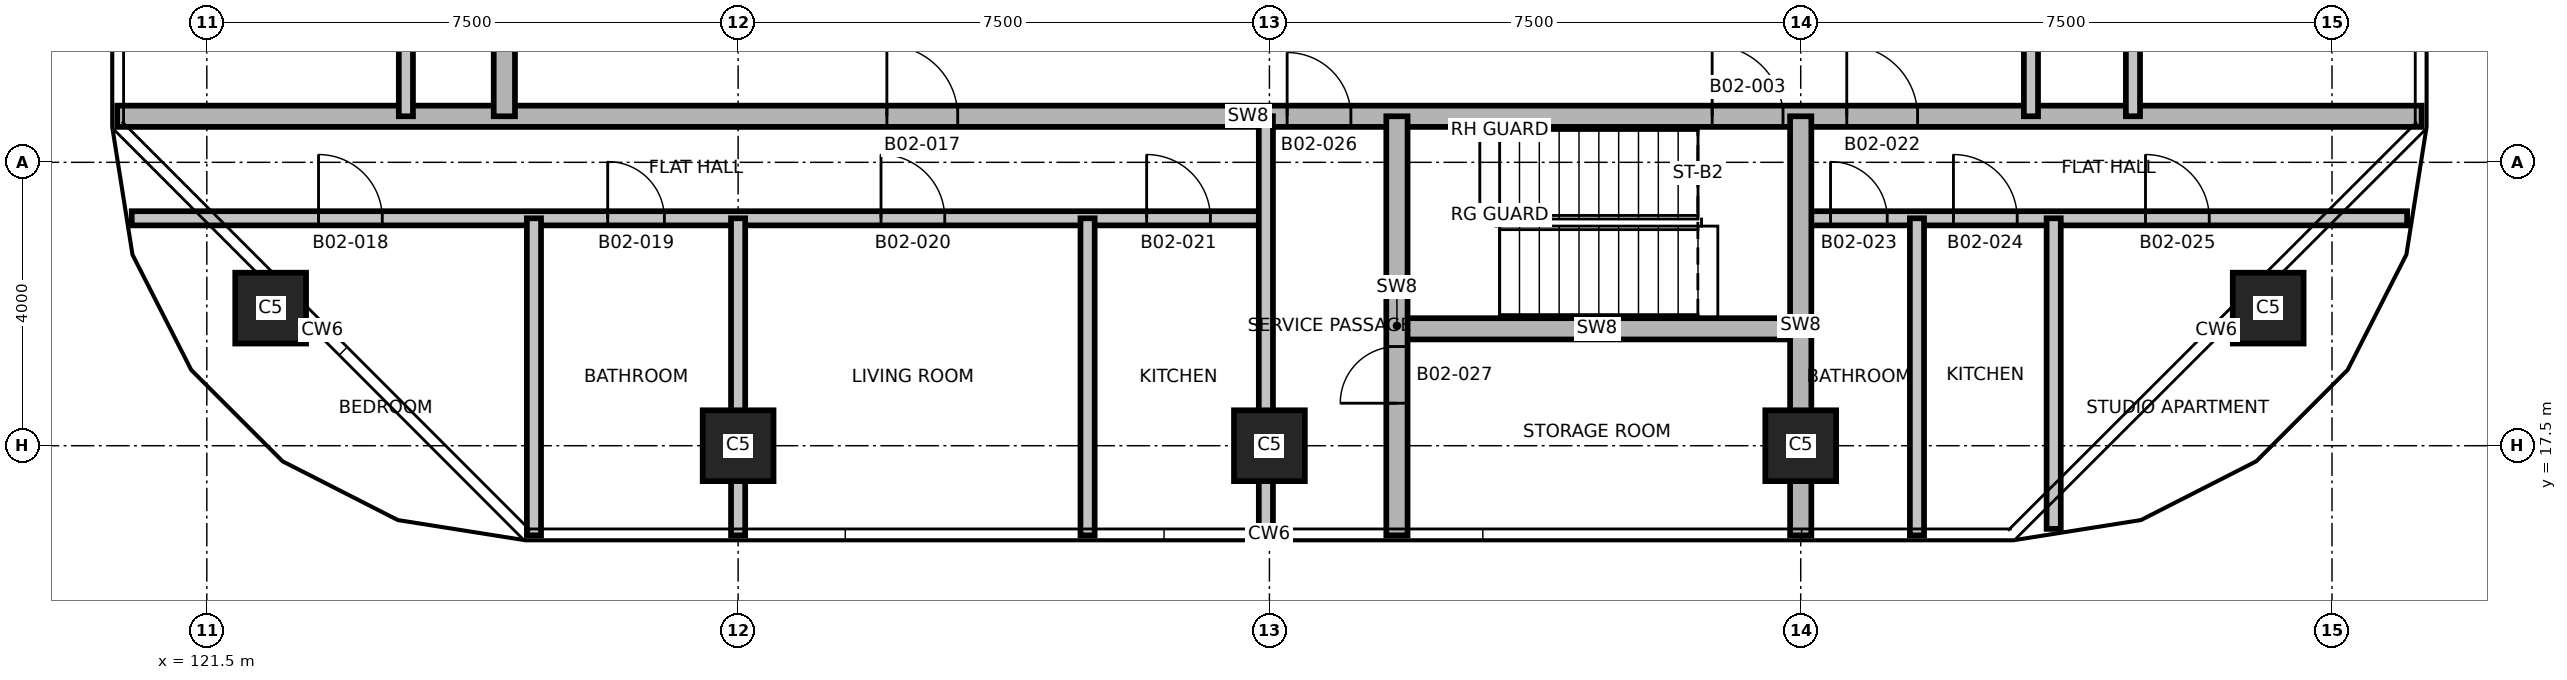
"""IFC4 building model, lengths in metres.
Left out: names, types, materials, properties, quantities, classifications, styles, units other than length and angle.
Written with IfcOpenShell. Run it as: python <this file> out.ifc"""

import sys

from ifc_helpers import new_model, si_unit, direction, frame, frame_2d, origin, origin_2d, place, context, subcontext, project, spatial, rectangle, extrude, element, fill, save


model = new_model("IFC4")
c1 = context("Model", 3, precision=1e-05, world=origin(), true_north=direction((0.0, 1.0)))
c2 = subcontext(c1, "Body", "Model", "MODEL_VIEW")
j1 = project(units=[si_unit("LENGTHUNIT", "METRE"), si_unit("PLANEANGLEUNIT", "RADIAN")], contexts=[c1])
p1 = place(None, origin())
s1 = spatial("IfcSite", under=j1, at=p1, CompositionType="ELEMENT")
p2 = place(p1, origin())
s2 = spatial("IfcBuilding", under=s1, at=p2, CompositionType="ELEMENT")
p3 = place(p2, frame((0.0, 0.0, 44.6)))
s3 = spatial("IfcBuildingStorey", under=s2, at=p3, CompositionType="ELEMENT", Elevation=44.6)
for number, where, z_axis, x_axis in (
    (1, (129.0, 17.5, 0.0), (0.0, 0.0, 1.0), (1.0, 0.0, 0.0)),
    (2, (136.5, 17.5, 0.0), (0.0, 0.0, 1.0), (1.0, 0.0, 0.0)),
    (3, (144.0, 17.5, 0.0), (0.0, 0.0, 1.0), (1.0, 0.0, 0.0)),
    (4, (122.401, 19.442, 0.0), (0.0, 0.0, 1.0), (1.0, 0.0, 0.0)),
    (5, (150.599, 19.442, 0.0), (0.0, 0.0, 1.0), (1.0, 0.0, 0.0)),
):
    element("IfcColumn", number, at=place(p3, frame(where, z_axis=z_axis, x_axis=x_axis)), inside=s3, PredefinedType="COLUMN", context=c2, shape_type="SweptSolid", body=[
        extrude(rectangle(XDim=1.0, YDim=1.0, at=origin_2d()), origin(), (0.0, 0.0, 1.0), 3.7),
    ])
p4 = place(p3, frame((138.25, 19.15, 0.0), z_axis=(0.0, 0.0, 1.0), x_axis=(1.0, 0.0, 0.0)))
e6 = element("IfcWall", 6, at=p4, inside=s3, PredefinedType="SHEAR", context=c2, shape_type="SweptSolid", body=[
    extrude(rectangle(XDim=5.75, YDim=0.3, at=frame_2d((2.875, 0.0))), origin(), (0.0, 0.0, 1.0), 3.4),
])
p5 = place(p3, frame((120.44, 20.71, 0.0), z_axis=(0.0, 0.0, 1.0), x_axis=(1.0, 0.0, 0.0)))
e7 = element("IfcWall", 7, at=p5, inside=s3, PredefinedType="PARTITIONING", context=c2, shape_type="SweptSolid", body=[
    extrude(rectangle(XDim=16.06, YDim=0.2, at=frame_2d((8.03, 0.0))), origin(), (0.0, 0.0, 1.0), 3.4),
])
p6 = place(p5, frame((2.637, 0.0, 0.0)))
e8 = element("IfcOpeningElement", 8, at=p6, cuts=e7, PredefinedType="OPENING", context=c2, shape_type="SweptSolid", body=[
    extrude(rectangle(XDim=0.9, YDim=2.1, at=frame_2d((0.45, 1.05))), frame((0.0, 0.11, 0.0), z_axis=(0.0, -1.0, 0.0), x_axis=(1.0, 0.0, 0.0)), (0.0, 0.0, 1.0), 0.22),
])
p7 = place(p5, frame((6.719, 0.0, 0.0)))
e9 = element("IfcOpeningElement", 9, at=p7, cuts=e7, PredefinedType="OPENING", context=c2, shape_type="SweptSolid", body=[
    extrude(rectangle(XDim=0.8, YDim=2.1, at=frame_2d((0.4, 1.05))), frame((0.0, 0.11, 0.0), z_axis=(0.0, -1.0, 0.0), x_axis=(1.0, 0.0, 0.0)), (0.0, 0.0, 1.0), 0.22),
])
p8 = place(p5, frame((10.577, 0.0, 0.0)))
e10 = element("IfcOpeningElement", 10, at=p8, cuts=e7, PredefinedType="OPENING", context=c2, shape_type="SweptSolid", body=[
    extrude(rectangle(XDim=0.9, YDim=2.1, at=frame_2d((0.45, 1.05))), frame((0.0, 0.11, 0.0), z_axis=(0.0, -1.0, 0.0), x_axis=(1.0, 0.0, 0.0)), (0.0, 0.0, 1.0), 0.22),
])
p9 = place(p5, frame((14.327, 0.0, 0.0)))
e11 = element("IfcOpeningElement", 11, at=p9, cuts=e7, PredefinedType="OPENING", context=c2, shape_type="SweptSolid", body=[
    extrude(rectangle(XDim=0.9, YDim=2.1, at=frame_2d((0.45, 1.05))), frame((0.0, 0.11, 0.0), z_axis=(0.0, -1.0, 0.0), x_axis=(1.0, 0.0, 0.0)), (0.0, 0.0, 1.0), 0.22),
])
p10 = place(p3, frame((144.0, 20.71, 0.0), z_axis=(0.0, 0.0, 1.0), x_axis=(1.0, 0.0, 0.0)))
e12 = element("IfcWall", 12, at=p10, inside=s3, PredefinedType="PARTITIONING", context=c2, shape_type="SweptSolid", body=[
    extrude(rectangle(XDim=8.56, YDim=0.2, at=frame_2d((4.28, 0.0))), origin(), (0.0, 0.0, 1.0), 3.4),
])
p11 = place(p10, frame((0.421, 0.0, 0.0)))
e13 = element("IfcOpeningElement", 13, at=p11, cuts=e12, PredefinedType="OPENING", context=c2, shape_type="SweptSolid", body=[
    extrude(rectangle(XDim=0.8, YDim=2.1, at=frame_2d((0.4, 1.05))), frame((0.0, 0.11, 0.0), z_axis=(0.0, -1.0, 0.0), x_axis=(1.0, 0.0, 0.0)), (0.0, 0.0, 1.0), 0.22),
])
p12 = place(p10, frame((2.156, 0.0, 0.0)))
e14 = element("IfcOpeningElement", 14, at=p12, cuts=e12, PredefinedType="OPENING", context=c2, shape_type="SweptSolid", body=[
    extrude(rectangle(XDim=0.9, YDim=2.1, at=frame_2d((0.45, 1.05))), frame((0.0, 0.11, 0.0), z_axis=(0.0, -1.0, 0.0), x_axis=(1.0, 0.0, 0.0)), (0.0, 0.0, 1.0), 0.22),
])
p13 = place(p10, frame((4.867, 0.0, 0.0)))
e15 = element("IfcOpeningElement", 15, at=p13, cuts=e12, PredefinedType="OPENING", context=c2, shape_type="SweptSolid", body=[
    extrude(rectangle(XDim=0.9, YDim=2.1, at=frame_2d((0.45, 1.05))), frame((0.0, 0.11, 0.0), z_axis=(0.0, -1.0, 0.0), x_axis=(1.0, 0.0, 0.0)), (0.0, 0.0, 1.0), 0.22),
])
p14 = place(p3, frame((120.235, 22.15, 0.0), z_axis=(0.0, 0.0, 1.0), x_axis=(1.0, 0.0, 0.0)))
e16 = element("IfcWall", 16, at=p14, inside=s3, PredefinedType="SHEAR", context=c2, shape_type="SweptSolid", body=[
    extrude(rectangle(XDim=32.53, YDim=0.3, at=frame_2d((16.265, 0.0))), origin(), (0.0, 0.0, 1.0), 3.4),
])
p15 = place(p14, frame((22.515, 0.0, 0.0)))
e17 = element("IfcOpeningElement", 17, at=p15, cuts=e16, PredefinedType="OPENING", context=c2, shape_type="SweptSolid", body=[
    extrude(rectangle(XDim=1.0, YDim=2.1, at=frame_2d((0.5, 1.05))), frame((0.0, 0.16, 0.0), z_axis=(0.0, -1.0, 0.0), x_axis=(1.0, 0.0, 0.0)), (0.0, 0.0, 1.0), 0.32),
])
p16 = place(p14, frame((10.865, 0.0, 0.0)))
e18 = element("IfcOpeningElement", 18, at=p16, cuts=e16, PredefinedType="OPENING", context=c2, shape_type="SweptSolid", body=[
    extrude(rectangle(XDim=1.0, YDim=2.1, at=frame_2d((0.5, 1.05))), frame((0.0, 0.16, 0.0), z_axis=(0.0, -1.0, 0.0), x_axis=(1.0, 0.0, 0.0)), (0.0, 0.0, 1.0), 0.32),
])
p17 = place(p14, frame((24.415, 0.0, 0.0)))
e19 = element("IfcOpeningElement", 19, at=p17, cuts=e16, PredefinedType="OPENING", context=c2, shape_type="SweptSolid", body=[
    extrude(rectangle(XDim=1.0, YDim=2.1, at=frame_2d((0.5, 1.05))), frame((0.0, 0.16, 0.0), z_axis=(0.0, -1.0, 0.0), x_axis=(1.0, 0.0, 0.0)), (0.0, 0.0, 1.0), 0.32),
])
p18 = place(p14, frame((16.515, 0.0, 0.0)))
e20 = element("IfcOpeningElement", 20, at=p18, cuts=e16, PredefinedType="OPENING", context=c2, shape_type="SweptSolid", body=[
    extrude(rectangle(XDim=0.9, YDim=2.1, at=frame_2d((0.45, 1.05))), frame((0.0, 0.16, 0.0), z_axis=(0.0, -1.0, 0.0), x_axis=(1.0, 0.0, 0.0)), (0.0, 0.0, 1.0), 0.32),
])
p19 = place(p3, frame((124.31, 22.15, 0.0), z_axis=(0.0, 0.0, 1.0), x_axis=(0.0, 1.0, 0.0)))
e21 = element("IfcWall", 21, at=p19, inside=s3, PredefinedType="PARTITIONING", context=c2, shape_type="SweptSolid", body=[
    extrude(rectangle(XDim=17.7, YDim=0.2, at=frame_2d((8.85, 0.0))), origin(), (0.0, 0.0, 1.0), 3.4),
])
p20 = place(p19, frame((1.725, 0.0, 0.0)))
e22 = element("IfcOpeningElement", 22, at=p20, cuts=e21, PredefinedType="OPENING", context=c2, shape_type="SweptSolid", body=[
    extrude(rectangle(XDim=0.9, YDim=2.1, at=frame_2d((0.45, 1.05))), frame((0.0, 0.11, 0.0), z_axis=(0.0, -1.0, 0.0), x_axis=(1.0, 0.0, 0.0)), (0.0, 0.0, 1.0), 0.22),
])
p21 = place(p19, frame((6.195, 0.0, 0.0)))
e23 = element("IfcOpeningElement", 23, at=p21, cuts=e21, PredefinedType="OPENING", context=c2, shape_type="SweptSolid", body=[
    extrude(rectangle(XDim=0.9, YDim=2.1, at=frame_2d((0.45, 1.05))), frame((0.0, 0.11, 0.0), z_axis=(0.0, -1.0, 0.0), x_axis=(1.0, 0.0, 0.0)), (0.0, 0.0, 1.0), 0.22),
])
p22 = place(p19, frame((9.641, 0.0, 0.0)))
e24 = element("IfcOpeningElement", 24, at=p22, cuts=e21, PredefinedType="OPENING", context=c2, shape_type="SweptSolid", body=[
    extrude(rectangle(XDim=0.9, YDim=2.1, at=frame_2d((0.45, 1.05))), frame((0.0, 0.11, 0.0), z_axis=(0.0, -1.0, 0.0), x_axis=(1.0, 0.0, 0.0)), (0.0, 0.0, 1.0), 0.22),
])
p23 = place(p19, frame((11.895, 0.0, 0.0)))
e25 = element("IfcOpeningElement", 25, at=p23, cuts=e21, PredefinedType="OPENING", context=c2, shape_type="SweptSolid", body=[
    extrude(rectangle(XDim=0.8, YDim=2.1, at=frame_2d((0.4, 1.05))), frame((0.0, 0.11, 0.0), z_axis=(0.0, -1.0, 0.0), x_axis=(1.0, 0.0, 0.0)), (0.0, 0.0, 1.0), 0.22),
])
p24 = place(p19, frame((14.378, 0.0, 0.0)))
e26 = element("IfcOpeningElement", 26, at=p24, cuts=e21, PredefinedType="OPENING", context=c2, shape_type="SweptSolid", body=[
    extrude(rectangle(XDim=0.9, YDim=2.1, at=frame_2d((0.45, 1.05))), frame((0.0, 0.11, 0.0), z_axis=(0.0, -1.0, 0.0), x_axis=(1.0, 0.0, 0.0)), (0.0, 0.0, 1.0), 0.22),
])
p25 = place(p19, frame((16.603, 0.0, 0.0)))
e27 = element("IfcOpeningElement", 27, at=p25, cuts=e21, PredefinedType="OPENING", context=c2, shape_type="SweptSolid", body=[
    extrude(rectangle(XDim=0.8, YDim=2.1, at=frame_2d((0.4, 1.05))), frame((0.0, 0.11, 0.0), z_axis=(0.0, -1.0, 0.0), x_axis=(1.0, 0.0, 0.0)), (0.0, 0.0, 1.0), 0.22),
])
p26 = place(p3, frame((125.7, 22.15, 0.0), z_axis=(0.0, 0.0, 1.0), x_axis=(0.0, 1.0, 0.0)))
e28 = element("IfcWall", 28, at=p26, inside=s3, PredefinedType="SHEAR", context=c2, shape_type="SweptSolid", body=[
    extrude(rectangle(XDim=17.7, YDim=0.3, at=frame_2d((8.85, 0.0))), origin(), (0.0, 0.0, 1.0), 3.4),
])
p27 = place(p26, frame((2.7, 0.0, 0.0)))
e29 = element("IfcOpeningElement", 29, at=p27, cuts=e28, PredefinedType="OPENING", context=c2, shape_type="SweptSolid", body=[
    extrude(rectangle(XDim=1.0, YDim=2.1, at=frame_2d((0.5, 1.05))), frame((0.0, 0.16, 0.0), z_axis=(0.0, -1.0, 0.0), x_axis=(1.0, 0.0, 0.0)), (0.0, 0.0, 1.0), 0.32),
])
for number, where, z_axis, x_axis in (
    (30, (126.118, 16.235, 0.0), (0.0, 0.0, 1.0), (0.0, 1.0, 0.0)),
    (31, (129.0, 16.235, 0.0), (0.0, 0.0, 1.0), (0.0, 1.0, 0.0)),
    (32, (133.933, 16.235, 0.0), (0.0, 0.0, 1.0), (0.0, 1.0, 0.0)),
):
    element("IfcWall", number, at=place(p3, frame(where, z_axis=z_axis, x_axis=x_axis)), inside=s3, PredefinedType="PARTITIONING", context=c2, shape_type="SweptSolid", body=[
        extrude(rectangle(XDim=4.475, YDim=0.2, at=frame_2d((2.237, 0.0))), origin(), (0.0, 0.0, 1.0), 3.4),
    ])
p28 = place(p3, frame((136.45, 16.235, 0.0), z_axis=(0.0, 0.0, 1.0), x_axis=(0.0, 1.0, 0.0)))
e33 = element("IfcWall", 33, at=p28, inside=s3, PredefinedType="PARTITIONING", context=c2, shape_type="SweptSolid", body=[
    extrude(rectangle(XDim=5.915, YDim=0.2, at=frame_2d((2.958, 0.0))), origin(), (0.0, 0.0, 1.0), 3.4),
])
p29 = place(p3, frame((138.3, 16.235, 0.0), z_axis=(0.0, 0.0, 1.0), x_axis=(0.0, 1.0, 0.0)))
e34 = element("IfcWall", 34, at=p29, inside=s3, PredefinedType="SHEAR", context=c2, shape_type="SweptSolid", body=[
    extrude(rectangle(XDim=5.915, YDim=0.3, at=frame_2d((2.958, 0.0))), origin(), (0.0, 0.0, 1.0), 3.4),
])
p30 = place(p29, frame((1.865, 0.0, 0.0)))
e35 = element("IfcOpeningElement", 35, at=p30, cuts=e34, PredefinedType="OPENING", context=c2, shape_type="SweptSolid", body=[
    extrude(rectangle(XDim=0.8, YDim=2.1, at=frame_2d((0.4, 1.05))), frame((0.0, 0.16, 0.0), z_axis=(0.0, -1.0, 0.0), x_axis=(1.0, 0.0, 0.0)), (0.0, 0.0, 1.0), 0.32),
])
p31 = place(p3, frame((144.0, 16.235, 0.0), z_axis=(0.0, 0.0, 1.0), x_axis=(0.0, 1.0, 0.0)))
e36 = element("IfcWall", 36, at=p31, inside=s3, PredefinedType="SHEAR", context=c2, shape_type="SweptSolid", body=[
    extrude(rectangle(XDim=5.915, YDim=0.3, at=frame_2d((2.958, 0.0))), origin(), (0.0, 0.0, 1.0), 3.4),
])
p32 = place(p3, frame((145.641, 16.235, 0.0), z_axis=(0.0, 0.0, 1.0), x_axis=(0.0, 1.0, 0.0)))
e37 = element("IfcWall", 37, at=p32, inside=s3, PredefinedType="PARTITIONING", context=c2, shape_type="SweptSolid", body=[
    extrude(rectangle(XDim=4.475, YDim=0.2, at=frame_2d((2.237, 0.0))), origin(), (0.0, 0.0, 1.0), 3.4),
])
p33 = place(p3, frame((147.25, 22.15, 0.0), z_axis=(0.0, 0.0, 1.0), x_axis=(0.0, 1.0, 0.0)))
e38 = element("IfcWall", 38, at=p33, inside=s3, PredefinedType="PARTITIONING", context=c2, shape_type="SweptSolid", body=[
    extrude(rectangle(XDim=17.7, YDim=0.2, at=frame_2d((8.85, 0.0))), origin(), (0.0, 0.0, 1.0), 3.4),
])
p34 = place(p33, frame((2.65, 0.0, 0.0)))
e39 = element("IfcOpeningElement", 39, at=p34, cuts=e38, PredefinedType="OPENING", context=c2, shape_type="SweptSolid", body=[
    extrude(rectangle(XDim=1.0, YDim=2.1, at=frame_2d((0.5, 1.05))), frame((0.0, 0.11, 0.0), z_axis=(0.0, -1.0, 0.0), x_axis=(1.0, 0.0, 0.0)), (0.0, 0.0, 1.0), 0.22),
])
p35 = place(p3, frame((147.571, 16.326, 0.0), z_axis=(0.0, 0.0, 1.0), x_axis=(0.0, 1.0, 0.0)))
e40 = element("IfcWall", 40, at=p35, inside=s3, PredefinedType="PARTITIONING", context=c2, shape_type="SweptSolid", body=[
    extrude(rectangle(XDim=4.384, YDim=0.2, at=frame_2d((2.192, 0.0))), origin(), (0.0, 0.0, 1.0), 3.4),
])
p36 = place(p3, frame((148.69, 22.15, 0.0), z_axis=(0.0, 0.0, 1.0), x_axis=(0.0, 1.0, 0.0)))
e41 = element("IfcWall", 41, at=p36, inside=s3, PredefinedType="PARTITIONING", context=c2, shape_type="SweptSolid", body=[
    extrude(rectangle(XDim=17.7, YDim=0.2, at=frame_2d((8.85, 0.0))), origin(), (0.0, 0.0, 1.0), 3.4),
])
p37 = place(p36, frame((1.028, 0.0, 0.0)))
e42 = element("IfcOpeningElement", 42, at=p37, cuts=e41, PredefinedType="OPENING", context=c2, shape_type="SweptSolid", body=[
    extrude(rectangle(XDim=0.9, YDim=2.1, at=frame_2d((0.45, 1.05))), frame((0.0, 0.11, 0.0), z_axis=(0.0, -1.0, 0.0), x_axis=(1.0, 0.0, 0.0)), (0.0, 0.0, 1.0), 0.22),
])
p38 = place(p36, frame((3.253, 0.0, 0.0)))
e43 = element("IfcOpeningElement", 43, at=p38, cuts=e41, PredefinedType="OPENING", context=c2, shape_type="SweptSolid", body=[
    extrude(rectangle(XDim=0.8, YDim=2.1, at=frame_2d((0.4, 1.05))), frame((0.0, 0.11, 0.0), z_axis=(0.0, -1.0, 0.0), x_axis=(1.0, 0.0, 0.0)), (0.0, 0.0, 1.0), 0.22),
])
p39 = place(p36, frame((6.867, 0.0, 0.0)))
e44 = element("IfcOpeningElement", 44, at=p39, cuts=e41, PredefinedType="OPENING", context=c2, shape_type="SweptSolid", body=[
    extrude(rectangle(XDim=0.9, YDim=2.1, at=frame_2d((0.45, 1.05))), frame((0.0, 0.11, 0.0), z_axis=(0.0, -1.0, 0.0), x_axis=(1.0, 0.0, 0.0)), (0.0, 0.0, 1.0), 0.22),
])
p40 = place(p36, frame((11.367, 0.0, 0.0)))
e45 = element("IfcOpeningElement", 45, at=p40, cuts=e41, PredefinedType="OPENING", context=c2, shape_type="SweptSolid", body=[
    extrude(rectangle(XDim=0.9, YDim=2.1, at=frame_2d((0.45, 1.05))), frame((0.0, 0.11, 0.0), z_axis=(0.0, -1.0, 0.0), x_axis=(1.0, 0.0, 0.0)), (0.0, 0.0, 1.0), 0.22),
])
p41 = place(p36, frame((15.075, 0.0, 0.0)))
e46 = element("IfcOpeningElement", 46, at=p41, cuts=e41, PredefinedType="OPENING", context=c2, shape_type="SweptSolid", body=[
    extrude(rectangle(XDim=0.9, YDim=2.1, at=frame_2d((0.45, 1.05))), frame((0.0, 0.11, 0.0), z_axis=(0.0, -1.0, 0.0), x_axis=(1.0, 0.0, 0.0)), (0.0, 0.0, 1.0), 0.22),
])
p42 = place(p15, origin())
e47 = element("IfcDoor", 47, at=p42, inside=s3, OperationType="SINGLE_SWING_LEFT", PredefinedType="DOOR", context=c2, shape_type="SweptSolid", body=[
    extrude(rectangle(XDim=1.0, YDim=2.1, at=frame_2d((0.5, 1.05))), frame((0.0, 0.025, 0.0), z_axis=(0.0, -1.0, 0.0), x_axis=(1.0, 0.0, 0.0)), (0.0, 0.0, 1.0), 0.05),
])
fill(e17, e47)
p43 = place(p16, origin())
e48 = element("IfcDoor", 48, at=p43, inside=s3, OperationType="SINGLE_SWING_LEFT", PredefinedType="DOOR", context=c2, shape_type="SweptSolid", body=[
    extrude(rectangle(XDim=1.0, YDim=2.1, at=frame_2d((0.5, 1.05))), frame((0.0, 0.025, 0.0), z_axis=(0.0, -1.0, 0.0), x_axis=(1.0, 0.0, 0.0)), (0.0, 0.0, 1.0), 0.05),
])
fill(e18, e48)
p44 = place(p6, origin())
e49 = element("IfcDoor", 49, at=p44, inside=s3, OperationType="SINGLE_SWING_RIGHT", PredefinedType="DOOR", context=c2, shape_type="SweptSolid", body=[
    extrude(rectangle(XDim=0.9, YDim=2.1, at=frame_2d((0.45, 1.05))), frame((0.0, 0.025, 0.0), z_axis=(0.0, -1.0, 0.0), x_axis=(1.0, 0.0, 0.0)), (0.0, 0.0, 1.0), 0.05),
])
fill(e8, e49)
p45 = place(p7, origin())
e50 = element("IfcDoor", 50, at=p45, inside=s3, OperationType="SINGLE_SWING_LEFT", PredefinedType="DOOR", context=c2, shape_type="SweptSolid", body=[
    extrude(rectangle(XDim=0.8, YDim=2.1, at=frame_2d((0.4, 1.05))), frame((0.0, 0.025, 0.0), z_axis=(0.0, -1.0, 0.0), x_axis=(1.0, 0.0, 0.0)), (0.0, 0.0, 1.0), 0.05),
])
fill(e9, e50)
p46 = place(p8, origin())
e51 = element("IfcDoor", 51, at=p46, inside=s3, OperationType="SINGLE_SWING_RIGHT", PredefinedType="DOOR", context=c2, shape_type="SweptSolid", body=[
    extrude(rectangle(XDim=0.9, YDim=2.1, at=frame_2d((0.45, 1.05))), frame((0.0, 0.025, 0.0), z_axis=(0.0, -1.0, 0.0), x_axis=(1.0, 0.0, 0.0)), (0.0, 0.0, 1.0), 0.05),
])
fill(e10, e51)
p47 = place(p9, origin())
e52 = element("IfcDoor", 52, at=p47, inside=s3, OperationType="SINGLE_SWING_LEFT", PredefinedType="DOOR", context=c2, shape_type="SweptSolid", body=[
    extrude(rectangle(XDim=0.9, YDim=2.1, at=frame_2d((0.45, 1.05))), frame((0.0, 0.025, 0.0), z_axis=(0.0, -1.0, 0.0), x_axis=(1.0, 0.0, 0.0)), (0.0, 0.0, 1.0), 0.05),
])
fill(e11, e52)
p48 = place(p17, origin())
e53 = element("IfcDoor", 53, at=p48, inside=s3, OperationType="SINGLE_SWING_RIGHT", PredefinedType="DOOR", context=c2, shape_type="SweptSolid", body=[
    extrude(rectangle(XDim=1.0, YDim=2.1, at=frame_2d((0.5, 1.05))), frame((0.0, 0.025, 0.0), z_axis=(0.0, -1.0, 0.0), x_axis=(1.0, 0.0, 0.0)), (0.0, 0.0, 1.0), 0.05),
])
fill(e19, e53)
p49 = place(p11, origin())
e54 = element("IfcDoor", 54, at=p49, inside=s3, OperationType="SINGLE_SWING_LEFT", PredefinedType="DOOR", context=c2, shape_type="SweptSolid", body=[
    extrude(rectangle(XDim=0.8, YDim=2.1, at=frame_2d((0.4, 1.05))), frame((0.0, 0.025, 0.0), z_axis=(0.0, -1.0, 0.0), x_axis=(1.0, 0.0, 0.0)), (0.0, 0.0, 1.0), 0.05),
])
fill(e13, e54)
p50 = place(p12, origin())
e55 = element("IfcDoor", 55, at=p50, inside=s3, OperationType="SINGLE_SWING_RIGHT", PredefinedType="DOOR", context=c2, shape_type="SweptSolid", body=[
    extrude(rectangle(XDim=0.9, YDim=2.1, at=frame_2d((0.45, 1.05))), frame((0.0, 0.025, 0.0), z_axis=(0.0, -1.0, 0.0), x_axis=(1.0, 0.0, 0.0)), (0.0, 0.0, 1.0), 0.05),
])
fill(e14, e55)
p51 = place(p13, origin())
e56 = element("IfcDoor", 56, at=p51, inside=s3, OperationType="SINGLE_SWING_LEFT", PredefinedType="DOOR", context=c2, shape_type="SweptSolid", body=[
    extrude(rectangle(XDim=0.9, YDim=2.1, at=frame_2d((0.45, 1.05))), frame((0.0, 0.025, 0.0), z_axis=(0.0, -1.0, 0.0), x_axis=(1.0, 0.0, 0.0)), (0.0, 0.0, 1.0), 0.05),
])
fill(e15, e56)
p52 = place(p18, origin())
e57 = element("IfcDoor", 57, at=p52, inside=s3, OperationType="SINGLE_SWING_RIGHT", PredefinedType="DOOR", context=c2, shape_type="SweptSolid", body=[
    extrude(rectangle(XDim=0.9, YDim=2.1, at=frame_2d((0.45, 1.05))), frame((0.0, 0.025, 0.0), z_axis=(0.0, -1.0, 0.0), x_axis=(1.0, 0.0, 0.0)), (0.0, 0.0, 1.0), 0.05),
])
fill(e20, e57)
p53 = place(p30, origin())
e58 = element("IfcDoor", 58, at=p53, inside=s3, OperationType="SINGLE_SWING_LEFT", PredefinedType="DOOR", context=c2, shape_type="SweptSolid", body=[
    extrude(rectangle(XDim=0.8, YDim=2.1, at=frame_2d((0.4, 1.05))), frame((0.0, 0.025, 0.0), z_axis=(0.0, -1.0, 0.0), x_axis=(1.0, 0.0, 0.0)), (0.0, 0.0, 1.0), 0.05),
])
fill(e35, e58)
save(model, sys.argv[1])
